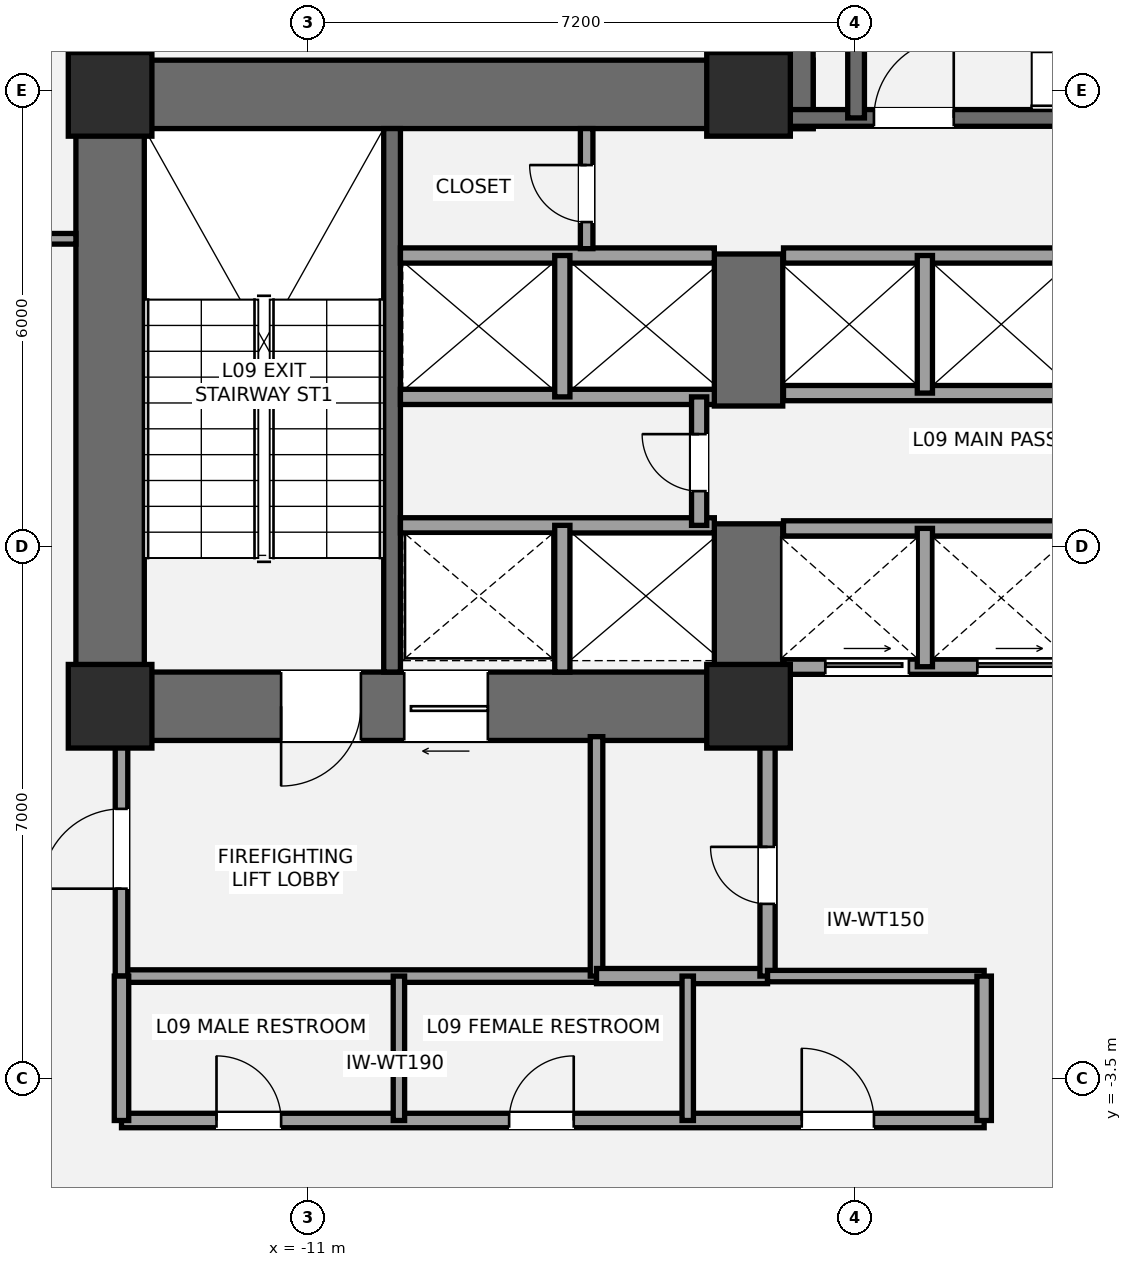
"""IFC4 building model, lengths in metres.
Left out: names, types, materials, properties, quantities, classifications, styles, units other than length and angle.
Written with IfcOpenShell. Run it as: python <this file> out.ifc"""

import sys

from ifc_helpers import new_model, si_unit, direction, frame, frame_2d, origin, origin_2d, place, context, subcontext, project, spatial, rectangle, extrude, element, fill, save


model = new_model("IFC4")
c1 = context("Model", 3, precision=1e-05, world=origin(), true_north=direction((0.0, 1.0)))
c2 = subcontext(c1, "Body", "Model", "MODEL_VIEW")
j1 = project(units=[si_unit("LENGTHUNIT", "METRE"), si_unit("PLANEANGLEUNIT", "RADIAN")], contexts=[c1])
p1 = place(None, origin())
s1 = spatial("IfcSite", under=j1, at=p1, CompositionType="ELEMENT")
p2 = place(p1, origin())
s2 = spatial("IfcBuilding", under=s1, at=p2, CompositionType="ELEMENT")
p3 = place(p2, frame((0.0, 0.0, 37.8)))
s3 = spatial("IfcBuildingStorey", under=s2, at=p3, CompositionType="ELEMENT", Elevation=37.8)
p4 = place(p3, frame((-13.6, 0.95, 0.0), z_axis=(0.0, 0.0, 1.0), x_axis=(0.0, 1.0, 0.0)))
e1 = element("IfcWall", 1, at=p4, inside=s3, PredefinedType="SHEAR", context=c2, shape_type="SweptSolid", body=[
    extrude(rectangle(XDim=8.95, YDim=0.9, at=frame_2d((4.475, 0.0))), origin(), (0.0, 0.0, 1.0), 3.6),
])
p5 = place(p3, frame((-14.05, 9.45, 0.0), z_axis=(0.0, 0.0, 1.0), x_axis=(1.0, 0.0, 0.0)))
e2 = element("IfcWall", 2, at=p5, inside=s3, PredefinedType="SHEAR", context=c2, shape_type="SweptSolid", body=[
    extrude(rectangle(XDim=9.7, YDim=0.9, at=frame_2d((4.85, 0.0))), origin(), (0.0, 0.0, 1.0), 3.6),
])
p6 = place(p3, frame((-4.75, 1.4, 0.0), z_axis=(0.0, 0.0, 1.0), x_axis=(-1.0, 0.0, 0.0)))
e3 = element("IfcWall", 3, at=p6, inside=s3, PredefinedType="SHEAR", context=c2, shape_type="SweptSolid", body=[
    extrude(rectangle(XDim=9.3, YDim=0.9, at=frame_2d((4.65, 0.0))), origin(), (0.0, 0.0, 1.0), 3.6),
])
p7 = place(p6, frame((5.55, 0.0, 0.0)))
e4 = element("IfcOpeningElement", 4, at=p7, cuts=e3, PredefinedType="OPENING", context=c2, shape_type="SweptSolid", body=[
    extrude(rectangle(XDim=1.05, YDim=2.15, at=frame_2d((0.525, 1.075))), frame((0.0, 0.46, 0.0), z_axis=(0.0, -1.0, 0.0), x_axis=(1.0, 0.0, 0.0)), (0.0, 0.0, 1.0), 0.92),
])
p8 = place(p6, frame((3.88, 0.0, 0.0)))
e5 = element("IfcOpeningElement", 5, at=p8, cuts=e3, PredefinedType="OPENING", context=c2, shape_type="SweptSolid", body=[
    extrude(rectangle(XDim=1.1, YDim=2.2, at=frame_2d((0.55, 1.1))), frame((0.0, 0.46, 0.0), z_axis=(0.0, -1.0, 0.0), x_axis=(1.0, 0.0, 0.0)), (0.0, 0.0, 1.0), 0.92),
])
p9 = place(p3, frame((-5.2, 0.95, 0.0), z_axis=(0.0, 0.0, 1.0), x_axis=(0.0, 1.0, 0.0)))
e6 = element("IfcWall", 6, at=p9, inside=s3, PredefinedType="SHEAR", context=c2, shape_type="SweptSolid", body=[
    extrude(rectangle(XDim=2.85, YDim=0.9, at=frame_2d((1.425, 0.0))), origin(), (0.0, 0.0, 1.0), 3.6),
])
p10 = place(p3, frame((-5.2, 5.35, 0.0), z_axis=(0.0, 0.0, 1.0), x_axis=(0.0, 1.0, 0.0)))
e7 = element("IfcWall", 7, at=p10, inside=s3, PredefinedType="SHEAR", context=c2, shape_type="SweptSolid", body=[
    extrude(rectangle(XDim=2.0, YDim=0.9, at=frame_2d((1.0, 0.0))), origin(), (0.0, 0.0, 1.0), 3.6),
])
p11 = place(p3, frame((-9.89, 1.85, 0.0), z_axis=(0.0, 0.0, 1.0), x_axis=(0.0, 1.0, 0.0)))
e8 = element("IfcWall", 8, at=p11, inside=s3, PredefinedType="SHEAR", context=c2, shape_type="SweptSolid", body=[
    extrude(rectangle(XDim=7.15, YDim=0.22, at=frame_2d((3.575, 0.0))), origin(), (0.0, 0.0, 1.0), 3.6),
])
p12 = place(p3, frame((-4.8, 9.0, 0.0), z_axis=(0.0, 0.0, 1.0), x_axis=(0.0, 1.0, 0.0)))
e9 = element("IfcWall", 9, at=p12, inside=s3, PredefinedType="SHEAR", context=c2, shape_type="SweptSolid", body=[
    extrude(rectangle(XDim=4.3, YDim=0.9, at=frame_2d((2.15, 0.0))), origin(), (0.0, 0.0, 1.0), 3.6),
])
p13 = place(p3, frame((-4.7, 9.14, 0.0), z_axis=(0.0, 0.0, 1.0), x_axis=(1.0, 0.0, 0.0)))
e10 = element("IfcWall", 10, at=p13, inside=s3, PredefinedType="SHEAR", context=c2, shape_type="SweptSolid", body=[
    extrude(rectangle(XDim=9.3, YDim=0.22, at=frame_2d((4.65, 0.0))), origin(), (0.0, 0.0, 1.0), 3.6),
])
p14 = place(p13, frame((1.15, 0.0, 0.0)))
e11 = element("IfcOpeningElement", 11, at=p14, cuts=e10, PredefinedType="OPENING", context=c2, shape_type="SweptSolid", body=[
    extrude(rectangle(XDim=1.05, YDim=2.15, at=frame_2d((0.525, 1.075))), frame((0.0, 0.12, 0.0), z_axis=(0.0, -1.0, 0.0), x_axis=(1.0, 0.0, 0.0)), (0.0, 0.0, 1.0), 0.24),
])
p15 = place(p3, frame((-3.785, 9.14, 0.0), z_axis=(0.0, 0.0, 1.0), x_axis=(0.0, 1.0, 0.0)))
e12 = element("IfcWall", 12, at=p15, inside=s3, PredefinedType="SHEAR", context=c2, shape_type="SweptSolid", body=[
    extrude(rectangle(XDim=3.26, YDim=0.22, at=frame_2d((1.63, 0.0))), origin(), (0.0, 0.0, 1.0), 3.6),
])
for number, where, z_axis, x_axis in (
    (13, (-13.6, 1.4, 0.0), (0.0, 0.0, 1.0), (1.0, 0.0, 0.0)),
    (14, (-13.6, 9.45, 0.0), (0.0, 0.0, 1.0), (1.0, 0.0, 0.0)),
    (15, (-5.2, 1.4, 0.0), (0.0, 0.0, 1.0), (1.0, 0.0, 0.0)),
    (16, (-5.2, 9.45, 0.0), (0.0, 0.0, 1.0), (1.0, 0.0, 0.0)),
):
    element("IfcColumn", number, at=place(p3, frame(where, z_axis=z_axis, x_axis=x_axis)), inside=s3, PredefinedType="COLUMN", context=c2, shape_type="SweptSolid", body=[
        extrude(rectangle(XDim=1.1, YDim=1.1, at=origin_2d()), origin(), (0.0, 0.0, 1.0), 3.6),
    ])
p16 = place(p3, frame((-13.45, -2.15, 0.0), z_axis=(0.0, 0.0, 1.0), x_axis=(1.0, 0.0, 0.0)))
e17 = element("IfcWall", 17, at=p16, inside=s3, PredefinedType="PARTITIONING", context=c2, shape_type="SweptSolid", body=[
    extrude(rectangle(XDim=6.25, YDim=0.165, at=frame_2d((3.125, 0.0))), origin(), (0.0, 0.0, 1.0), 2.853),
])
p17 = place(p3, frame((-13.45, -2.15, 0.0), z_axis=(0.0, 0.0, 1.0), x_axis=(0.0, 1.0, 0.0)))
e18 = element("IfcWall", 18, at=p17, inside=s3, PredefinedType="PARTITIONING", context=c2, shape_type="SweptSolid", body=[
    extrude(rectangle(XDim=3.15, YDim=0.165, at=frame_2d((1.575, 0.0))), origin(), (0.0, 0.0, 1.0), 2.853),
])
p18 = place(p17, frame((1.15, 0.0, 0.0)))
e19 = element("IfcOpeningElement", 19, at=p18, cuts=e18, PredefinedType="OPENING", context=c2, shape_type="SweptSolid", body=[
    extrude(rectangle(XDim=1.05, YDim=2.15, at=frame_2d((0.525, 1.075))), frame((0.0, 0.093, 0.0), z_axis=(0.0, -1.0, 0.0), x_axis=(1.0, 0.0, 0.0)), (0.0, 0.0, 1.0), 0.185),
])
p19 = place(p3, frame((-7.2, -2.15, 0.0), z_axis=(0.0, 0.0, 1.0), x_axis=(0.0, 1.0, 0.0)))
e20 = element("IfcWall", 20, at=p19, inside=s3, PredefinedType="PARTITIONING", context=c2, shape_type="SweptSolid", body=[
    extrude(rectangle(XDim=3.15, YDim=0.165, at=frame_2d((1.575, 0.0))), origin(), (0.0, 0.0, 1.0), 2.853),
])
p20 = place(p3, frame((-7.2, -2.15, 0.0), z_axis=(0.0, 0.0, 1.0), x_axis=(1.0, 0.0, 0.0)))
e21 = element("IfcWall", 21, at=p20, inside=s3, PredefinedType="SOLIDWALL", context=c2, shape_type="SweptSolid", body=[
    extrude(rectangle(XDim=2.25, YDim=0.2, at=frame_2d((1.125, 0.0))), origin(), (0.0, 0.0, 1.0), 3.4),
])
p21 = place(p3, frame((-4.95, -2.15, 0.0), z_axis=(0.0, 0.0, 1.0), x_axis=(0.0, 1.0, 0.0)))
e22 = element("IfcWall", 22, at=p21, inside=s3, PredefinedType="SOLIDWALL", context=c2, shape_type="SweptSolid", body=[
    extrude(rectangle(XDim=3.15, YDim=0.2, at=frame_2d((1.575, 0.0))), origin(), (0.0, 0.0, 1.0), 2.853),
])
p22 = place(p21, frame((0.95, 0.0, 0.0)))
e23 = element("IfcOpeningElement", 23, at=p22, cuts=e22, PredefinedType="OPENING", context=c2, shape_type="SweptSolid", body=[
    extrude(rectangle(XDim=0.75, YDim=2.1, at=frame_2d((0.375, 1.05))), frame((0.0, 0.11, 0.0), z_axis=(0.0, -1.0, 0.0), x_axis=(1.0, 0.0, 0.0)), (0.0, 0.0, 1.0), 0.22),
])
p23 = place(p3, frame((-9.78, 3.78, 0.0), z_axis=(0.0, 0.0, 1.0), x_axis=(1.0, 0.0, 0.0)))
e24 = element("IfcWall", 24, at=p23, inside=s3, PredefinedType="SOLIDWALL", context=c2, shape_type="SweptSolid", body=[
    extrude(rectangle(XDim=4.13, YDim=0.2, at=frame_2d((2.065, 0.0))), origin(), (0.0, 0.0, 1.0), 3.4),
])
p24 = place(p3, frame((-7.65, 1.85, 0.0), z_axis=(0.0, 0.0, 1.0), x_axis=(0.0, 1.0, 0.0)))
e25 = element("IfcWall", 25, at=p24, inside=s3, PredefinedType="SOLIDWALL", context=c2, shape_type="SweptSolid", body=[
    extrude(rectangle(XDim=1.93, YDim=0.2, at=frame_2d((0.965, 0.0))), origin(), (0.0, 0.0, 1.0), 3.4),
])
for number, where, z_axis, x_axis in (
    (26, (-9.78, 5.47, 0.0), (0.0, 0.0, 1.0), (1.0, 0.0, 0.0)),
    (27, (-9.78, 7.33, 0.0), (0.0, 0.0, 1.0), (1.0, 0.0, 0.0)),
):
    element("IfcWall", number, at=place(p3, frame(where, z_axis=z_axis, x_axis=x_axis)), inside=s3, PredefinedType="SOLIDWALL", context=c2, shape_type="SweptSolid", body=[
        extrude(rectangle(XDim=4.13, YDim=0.2, at=frame_2d((2.065, 0.0))), origin(), (0.0, 0.0, 1.0), 3.4),
    ])
p25 = place(p3, frame((-7.65, 5.47, 0.0), z_axis=(0.0, 0.0, 1.0), x_axis=(0.0, 1.0, 0.0)))
e28 = element("IfcWall", 28, at=p25, inside=s3, PredefinedType="SOLIDWALL", context=c2, shape_type="SweptSolid", body=[
    extrude(rectangle(XDim=1.86, YDim=0.2, at=frame_2d((0.93, 0.0))), origin(), (0.0, 0.0, 1.0), 3.4),
])
p26 = place(p3, frame((-5.85, 3.78, 0.0), z_axis=(0.0, 0.0, 1.0), x_axis=(0.0, 1.0, 0.0)))
e29 = element("IfcWall", 29, at=p26, inside=s3, PredefinedType="SOLIDWALL", context=c2, shape_type="SweptSolid", body=[
    extrude(rectangle(XDim=1.69, YDim=0.2, at=frame_2d((0.845, 0.0))), origin(), (0.0, 0.0, 1.0), 3.4),
])
p27 = place(p26, frame((0.45, 0.0, 0.0)))
e30 = element("IfcOpeningElement", 30, at=p27, cuts=e29, PredefinedType="OPENING", context=c2, shape_type="SweptSolid", body=[
    extrude(rectangle(XDim=0.75, YDim=2.1, at=frame_2d((0.375, 1.05))), frame((0.0, 0.11, 0.0), z_axis=(0.0, -1.0, 0.0), x_axis=(1.0, 0.0, 0.0)), (0.0, 0.0, 1.0), 0.22),
])
p28 = place(p3, frame((-4.74, 1.92, 0.0), z_axis=(0.0, 0.0, 1.0), x_axis=(1.0, 0.0, 0.0)))
e31 = element("IfcWall", 31, at=p28, inside=s3, PredefinedType="SOLIDWALL", context=c2, shape_type="SweptSolid", body=[
    extrude(rectangle(XDim=3.86, YDim=0.2, at=frame_2d((1.93, 0.0))), origin(), (0.0, 0.0, 1.0), 2.39),
])
p29 = place(p28, frame((0.55, 0.0, 0.0)))
e32 = element("IfcOpeningElement", 32, at=p29, cuts=e31, PredefinedType="OPENING", context=c2, shape_type="SweptSolid", body=[
    extrude(rectangle(XDim=1.1, YDim=2.2, at=frame_2d((0.55, 1.1))), frame((0.0, 0.11, 0.0), z_axis=(0.0, -1.0, 0.0), x_axis=(1.0, 0.0, 0.0)), (0.0, 0.0, 1.0), 0.22),
])
p30 = place(p28, frame((2.55, 0.0, 0.0)))
e33 = element("IfcOpeningElement", 33, at=p30, cuts=e31, PredefinedType="OPENING", context=c2, shape_type="SweptSolid", body=[
    extrude(rectangle(XDim=1.1, YDim=2.2, at=frame_2d((0.55, 1.1))), frame((0.0, 0.11, 0.0), z_axis=(0.0, -1.0, 0.0), x_axis=(1.0, 0.0, 0.0)), (0.0, 0.0, 1.0), 0.22),
])
p31 = place(p3, frame((-4.74, 3.74, 0.0), z_axis=(0.0, 0.0, 1.0), x_axis=(1.0, 0.0, 0.0)))
e34 = element("IfcWall", 34, at=p31, inside=s3, PredefinedType="SOLIDWALL", context=c2, shape_type="SweptSolid", body=[
    extrude(rectangle(XDim=3.86, YDim=0.2, at=frame_2d((1.93, 0.0))), origin(), (0.0, 0.0, 1.0), 3.4),
])
p32 = place(p3, frame((-2.88, 1.92, 0.0), z_axis=(0.0, 0.0, 1.0), x_axis=(0.0, 1.0, 0.0)))
e35 = element("IfcWall", 35, at=p32, inside=s3, PredefinedType="SOLIDWALL", context=c2, shape_type="SweptSolid", body=[
    extrude(rectangle(XDim=1.82, YDim=0.2, at=frame_2d((0.91, 0.0))), origin(), (0.0, 0.0, 1.0), 3.4),
])
for number, where, z_axis, x_axis in (
    (36, (-4.74, 5.52, 0.0), (0.0, 0.0, 1.0), (1.0, 0.0, 0.0)),
    (37, (-4.74, 7.33, 0.0), (0.0, 0.0, 1.0), (1.0, 0.0, 0.0)),
):
    element("IfcWall", number, at=place(p3, frame(where, z_axis=z_axis, x_axis=x_axis)), inside=s3, PredefinedType="SOLIDWALL", context=c2, shape_type="SweptSolid", body=[
        extrude(rectangle(XDim=3.86, YDim=0.2, at=frame_2d((1.93, 0.0))), origin(), (0.0, 0.0, 1.0), 3.4),
    ])
p33 = place(p3, frame((-2.88, 5.52, 0.0), z_axis=(0.0, 0.0, 1.0), x_axis=(0.0, 1.0, 0.0)))
e38 = element("IfcWall", 38, at=p33, inside=s3, PredefinedType="SOLIDWALL", context=c2, shape_type="SweptSolid", body=[
    extrude(rectangle(XDim=1.81, YDim=0.2, at=frame_2d((0.905, 0.0))), origin(), (0.0, 0.0, 1.0), 3.4),
])
p34 = place(p3, frame((-7.33, 7.42, 0.0), z_axis=(0.0, 0.0, 1.0), x_axis=(0.0, 1.0, 0.0)))
e39 = element("IfcWall", 39, at=p34, inside=s3, PredefinedType="PARTITIONING", context=c2, shape_type="SweptSolid", body=[
    extrude(rectangle(XDim=1.58, YDim=0.165, at=frame_2d((0.79, 0.0))), origin(), (0.0, 0.0, 1.0), 3.4),
])
p35 = place(p34, frame((0.35, 0.0, 0.0)))
e40 = element("IfcOpeningElement", 40, at=p35, cuts=e39, PredefinedType="OPENING", context=c2, shape_type="SweptSolid", body=[
    extrude(rectangle(XDim=0.75, YDim=2.1, at=frame_2d((0.375, 1.05))), frame((0.0, 0.093, 0.0), z_axis=(0.0, -1.0, 0.0), x_axis=(1.0, 0.0, 0.0)), (0.0, 0.0, 1.0), 0.185),
])
p36 = place(p3, frame((-13.45, -4.05, 0.0), z_axis=(0.0, 0.0, 1.0), x_axis=(1.0, 0.0, 0.0)))
e41 = element("IfcWall", 41, at=p36, inside=s3, PredefinedType="PLUMBINGWALL", context=c2, shape_type="SweptSolid", body=[
    extrude(rectangle(XDim=11.35, YDim=0.19, at=frame_2d((5.675, 0.0))), origin(), (0.0, 0.0, 1.0), 2.853),
])
p37 = place(p36, frame((1.25, 0.0, 0.0)))
e42 = element("IfcOpeningElement", 42, at=p37, cuts=e41, PredefinedType="OPENING", context=c2, shape_type="SweptSolid", body=[
    extrude(rectangle(XDim=0.85, YDim=2.1, at=frame_2d((0.425, 1.05))), frame((0.0, 0.105, 0.0), z_axis=(0.0, -1.0, 0.0), x_axis=(1.0, 0.0, 0.0)), (0.0, 0.0, 1.0), 0.21),
])
p38 = place(p36, frame((5.1, 0.0, 0.0)))
e43 = element("IfcOpeningElement", 43, at=p38, cuts=e41, PredefinedType="OPENING", context=c2, shape_type="SweptSolid", body=[
    extrude(rectangle(XDim=0.85, YDim=2.1, at=frame_2d((0.425, 1.05))), frame((0.0, 0.105, 0.0), z_axis=(0.0, -1.0, 0.0), x_axis=(1.0, 0.0, 0.0)), (0.0, 0.0, 1.0), 0.21),
])
p39 = place(p36, frame((8.95, 0.0, 0.0)))
e44 = element("IfcOpeningElement", 44, at=p39, cuts=e41, PredefinedType="OPENING", context=c2, shape_type="SweptSolid", body=[
    extrude(rectangle(XDim=0.95, YDim=2.15, at=frame_2d((0.475, 1.075))), frame((0.0, 0.105, 0.0), z_axis=(0.0, -1.0, 0.0), x_axis=(1.0, 0.0, 0.0)), (0.0, 0.0, 1.0), 0.21),
])
p40 = place(p3, frame((-4.95, -2.15, 0.0), z_axis=(0.0, 0.0, 1.0), x_axis=(1.0, 0.0, 0.0)))
e45 = element("IfcWall", 45, at=p40, inside=s3, PredefinedType="PLUMBINGWALL", context=c2, shape_type="SweptSolid", body=[
    extrude(rectangle(XDim=2.85, YDim=0.15, at=frame_2d((1.425, 0.0))), origin(), (0.0, 0.0, 1.0), 2.853),
])
p41 = place(p3, frame((-13.45, -4.05, 0.0), z_axis=(0.0, 0.0, 1.0), x_axis=(0.0, 1.0, 0.0)))
e46 = element("IfcWall", 46, at=p41, inside=s3, PredefinedType="PLUMBINGWALL", context=c2, shape_type="SweptSolid", body=[
    extrude(rectangle(XDim=1.9, YDim=0.19, at=frame_2d((0.95, 0.0))), origin(), (0.0, 0.0, 1.0), 2.853),
])
p42 = place(p3, frame((-2.1, -4.05, 0.0), z_axis=(0.0, 0.0, 1.0), x_axis=(0.0, 1.0, 0.0)))
e47 = element("IfcWall", 47, at=p42, inside=s3, PredefinedType="PLUMBINGWALL", context=c2, shape_type="SweptSolid", body=[
    extrude(rectangle(XDim=1.9, YDim=0.19, at=frame_2d((0.95, 0.0))), origin(), (0.0, 0.0, 1.0), 3.4),
])
p43 = place(p3, frame((-9.8, -4.05, 0.0), z_axis=(0.0, 0.0, 1.0), x_axis=(0.0, 1.0, 0.0)))
e48 = element("IfcWall", 48, at=p43, inside=s3, PredefinedType="PLUMBINGWALL", context=c2, shape_type="SweptSolid", body=[
    extrude(rectangle(XDim=1.9, YDim=0.15, at=frame_2d((0.95, 0.0))), origin(), (0.0, 0.0, 1.0), 2.853),
])
p44 = place(p3, frame((-6.0, -4.05, 0.0), z_axis=(0.0, 0.0, 1.0), x_axis=(0.0, 1.0, 0.0)))
e49 = element("IfcWall", 49, at=p44, inside=s3, PredefinedType="PLUMBINGWALL", context=c2, shape_type="SweptSolid", body=[
    extrude(rectangle(XDim=1.9, YDim=0.15, at=frame_2d((0.95, 0.0))), origin(), (0.0, 0.0, 1.0), 2.841),
])
p45 = place(p3, frame((-24.181, 7.55, 0.0), z_axis=(0.0, 0.0, 1.0), x_axis=(1.0, 0.0, 0.0)))
e50 = element("IfcWall", 50, at=p45, inside=s3, PredefinedType="PARTITIONING", context=c2, shape_type="SweptSolid", body=[
    extrude(rectangle(XDim=10.131, YDim=0.14, at=frame_2d((5.065, 0.0))), origin(), (0.0, 0.0, 1.0), 2.853),
])
p46 = place(p45, frame((1.963, 0.0, 0.0)))
e51 = element("IfcOpeningElement", 51, at=p46, cuts=e50, PredefinedType="OPENING", context=c2, shape_type="SweptSolid", body=[
    extrude(rectangle(XDim=0.92, YDim=2.15, at=frame_2d((0.46, 1.075))), frame((0.0, 0.08, 0.0), z_axis=(0.0, -1.0, 0.0), x_axis=(1.0, 0.0, 0.0)), (0.0, 0.0, 1.0), 0.16),
])
p47 = place(p7, origin())
e52 = element("IfcDoor", 52, at=p47, inside=s3, OperationType="SINGLE_SWING_RIGHT", PredefinedType="DOOR", context=c2, shape_type="SweptSolid", body=[
    extrude(rectangle(XDim=1.05, YDim=2.15, at=frame_2d((0.525, 1.075))), frame((0.0, 0.025, 0.0), z_axis=(0.0, -1.0, 0.0), x_axis=(1.0, 0.0, 0.0)), (0.0, 0.0, 1.0), 0.05),
])
fill(e4, e52)
p48 = place(p14, origin())
e53 = element("IfcDoor", 53, at=p48, inside=s3, OperationType="SINGLE_SWING_RIGHT", PredefinedType="DOOR", context=c2, shape_type="SweptSolid", body=[
    extrude(rectangle(XDim=1.05, YDim=2.15, at=frame_2d((0.525, 1.075))), frame((0.0, 0.025, 0.0), z_axis=(0.0, -1.0, 0.0), x_axis=(1.0, 0.0, 0.0)), (0.0, 0.0, 1.0), 0.05),
])
fill(e11, e53)
p49 = place(p18, origin())
e54 = element("IfcDoor", 54, at=p49, inside=s3, OperationType="SINGLE_SWING_LEFT", PredefinedType="DOOR", context=c2, shape_type="SweptSolid", body=[
    extrude(rectangle(XDim=1.05, YDim=2.15, at=frame_2d((0.525, 1.075))), frame((0.0, 0.025, 0.0), z_axis=(0.0, -1.0, 0.0), x_axis=(1.0, 0.0, 0.0)), (0.0, 0.0, 1.0), 0.05),
])
fill(e19, e54)
p50 = place(p22, origin())
e55 = element("IfcDoor", 55, at=p50, inside=s3, OperationType="SINGLE_SWING_RIGHT", PredefinedType="DOOR", context=c2, shape_type="SweptSolid", body=[
    extrude(rectangle(XDim=0.75, YDim=2.1, at=frame_2d((0.375, 1.05))), frame((0.0, 0.025, 0.0), z_axis=(0.0, -1.0, 0.0), x_axis=(1.0, 0.0, 0.0)), (0.0, 0.0, 1.0), 0.05),
])
fill(e23, e55)
p51 = place(p8, origin())
e56 = element("IfcDoor", 56, at=p51, inside=s3, OperationType="SLIDING_TO_LEFT", PredefinedType="DOOR", context=c2, shape_type="SweptSolid", body=[
    extrude(rectangle(XDim=1.1, YDim=2.2, at=frame_2d((0.55, 1.1))), frame((0.0, 0.025, 0.0), z_axis=(0.0, -1.0, 0.0), x_axis=(1.0, 0.0, 0.0)), (0.0, 0.0, 1.0), 0.05),
])
fill(e5, e56)
p52 = place(p27, origin())
e57 = element("IfcDoor", 57, at=p52, inside=s3, OperationType="SINGLE_SWING_RIGHT", PredefinedType="DOOR", context=c2, shape_type="SweptSolid", body=[
    extrude(rectangle(XDim=0.75, YDim=2.1, at=frame_2d((0.375, 1.05))), frame((0.0, 0.025, 0.0), z_axis=(0.0, -1.0, 0.0), x_axis=(1.0, 0.0, 0.0)), (0.0, 0.0, 1.0), 0.05),
])
fill(e30, e57)
p53 = place(p29, origin())
e58 = element("IfcDoor", 58, at=p53, inside=s3, OperationType="SLIDING_TO_LEFT", PredefinedType="DOOR", context=c2, shape_type="SweptSolid", body=[
    extrude(rectangle(XDim=1.1, YDim=2.2, at=frame_2d((0.55, 1.1))), frame((0.0, 0.025, 0.0), z_axis=(0.0, -1.0, 0.0), x_axis=(1.0, 0.0, 0.0)), (0.0, 0.0, 1.0), 0.05),
])
fill(e32, e58)
p54 = place(p30, origin())
e59 = element("IfcDoor", 59, at=p54, inside=s3, OperationType="SLIDING_TO_LEFT", PredefinedType="DOOR", context=c2, shape_type="SweptSolid", body=[
    extrude(rectangle(XDim=1.1, YDim=2.2, at=frame_2d((0.55, 1.1))), frame((0.0, 0.025, 0.0), z_axis=(0.0, -1.0, 0.0), x_axis=(1.0, 0.0, 0.0)), (0.0, 0.0, 1.0), 0.05),
])
fill(e33, e59)
p55 = place(p35, origin())
e60 = element("IfcDoor", 60, at=p55, inside=s3, OperationType="SINGLE_SWING_RIGHT", PredefinedType="DOOR", context=c2, shape_type="SweptSolid", body=[
    extrude(rectangle(XDim=0.75, YDim=2.1, at=frame_2d((0.375, 1.05))), frame((0.0, 0.025, 0.0), z_axis=(0.0, -1.0, 0.0), x_axis=(1.0, 0.0, 0.0)), (0.0, 0.0, 1.0), 0.05),
])
fill(e40, e60)
p56 = place(p37, origin())
e61 = element("IfcDoor", 61, at=p56, inside=s3, OperationType="SINGLE_SWING_LEFT", PredefinedType="DOOR", context=c2, shape_type="SweptSolid", body=[
    extrude(rectangle(XDim=0.85, YDim=2.1, at=frame_2d((0.425, 1.05))), frame((0.0, 0.025, 0.0), z_axis=(0.0, -1.0, 0.0), x_axis=(1.0, 0.0, 0.0)), (0.0, 0.0, 1.0), 0.05),
])
fill(e42, e61)
p57 = place(p38, origin())
e62 = element("IfcDoor", 62, at=p57, inside=s3, OperationType="SINGLE_SWING_RIGHT", PredefinedType="DOOR", context=c2, shape_type="SweptSolid", body=[
    extrude(rectangle(XDim=0.85, YDim=2.1, at=frame_2d((0.425, 1.05))), frame((0.0, 0.025, 0.0), z_axis=(0.0, -1.0, 0.0), x_axis=(1.0, 0.0, 0.0)), (0.0, 0.0, 1.0), 0.05),
])
fill(e43, e62)
p58 = place(p39, origin())
e63 = element("IfcDoor", 63, at=p58, inside=s3, OperationType="SINGLE_SWING_LEFT", PredefinedType="DOOR", context=c2, shape_type="SweptSolid", body=[
    extrude(rectangle(XDim=0.95, YDim=2.15, at=frame_2d((0.475, 1.075))), frame((0.0, 0.025, 0.0), z_axis=(0.0, -1.0, 0.0), x_axis=(1.0, 0.0, 0.0)), (0.0, 0.0, 1.0), 0.05),
])
fill(e44, e63)
save(model, sys.argv[1])
